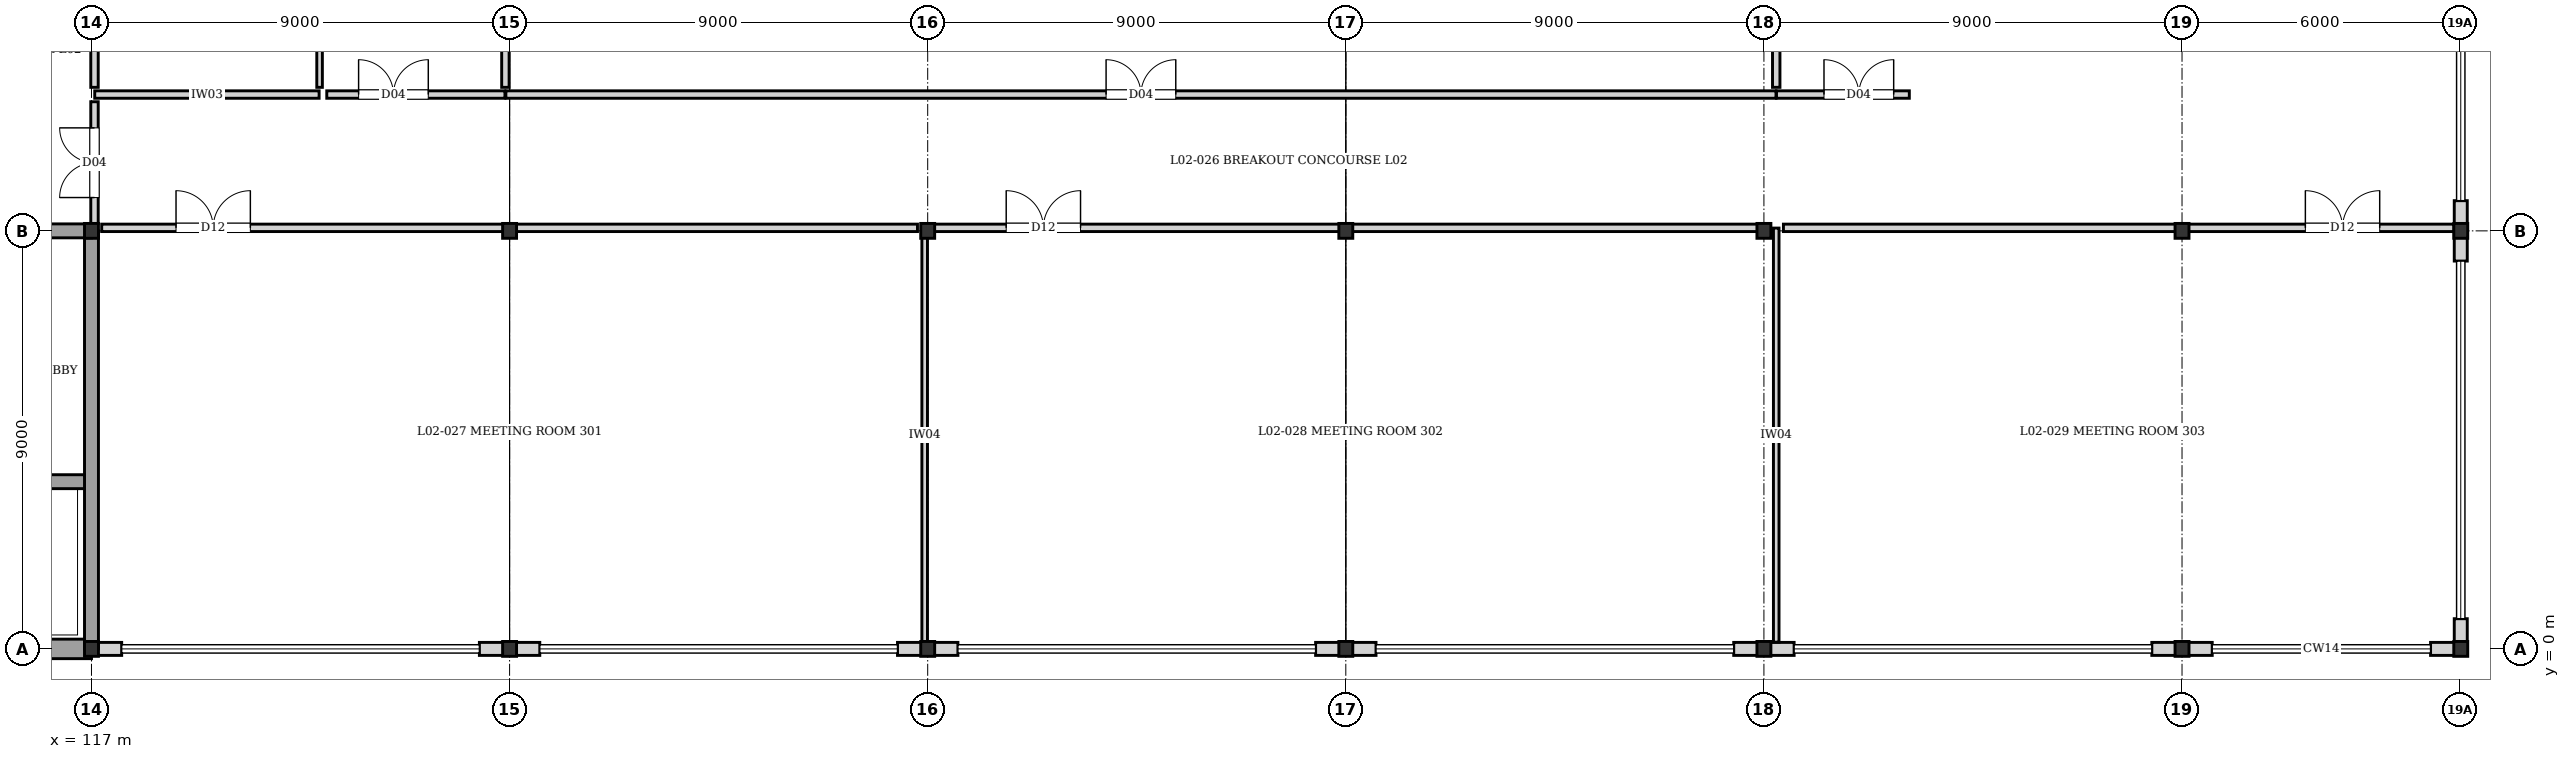
"""IFC4 building model, lengths in metres.
Left out: names, types, materials, properties, quantities, classifications, styles, units other than length and angle.
Written with IfcOpenShell. Run it as: python <this file> out.ifc"""

import sys

from ifc_helpers import new_model, si_unit, direction, frame, frame_2d, origin, origin_2d, place, context, subcontext, project, spatial, rectangle, i_section, extrude, element, fill, save


model = new_model("IFC4")
c1 = context("Model", 3, precision=1e-05, world=origin(), true_north=direction((0.0, 1.0)))
c2 = subcontext(c1, "Body", "Model", "MODEL_VIEW")
j1 = project(units=[si_unit("LENGTHUNIT", "METRE"), si_unit("PLANEANGLEUNIT", "RADIAN")], contexts=[c1])
p1 = place(None, origin())
s1 = spatial("IfcSite", under=j1, at=p1, CompositionType="ELEMENT")
p2 = place(p1, origin())
s2 = spatial("IfcBuilding", under=s1, at=p2, CompositionType="ELEMENT")
p3 = place(p2, frame((0.0, 0.0, 8.16)))
s3 = spatial("IfcBuildingStorey", under=s2, at=p3, CompositionType="ELEMENT", Elevation=8.16)
for number, where, z_axis, x_axis in (
    (1, (117.0, 0.0, 0.0), (0.0, 0.0, 1.0), (1.0, 0.0, 0.0)),
    (2, (117.0, 9.0, 0.0), (0.0, 0.0, 1.0), (1.0, 0.0, 0.0)),
    (3, (126.0, 0.0, 0.0), (0.0, 0.0, 1.0), (1.0, 0.0, 0.0)),
    (4, (126.0, 9.0, 0.0), (0.0, 0.0, 1.0), (1.0, 0.0, 0.0)),
    (5, (135.0, 0.0, 0.0), (0.0, 0.0, 1.0), (1.0, 0.0, 0.0)),
    (6, (135.0, 9.0, 0.0), (0.0, 0.0, 1.0), (1.0, 0.0, 0.0)),
    (7, (144.0, 0.0, 0.0), (0.0, 0.0, 1.0), (1.0, 0.0, 0.0)),
    (8, (144.0, 9.0, 0.0), (0.0, 0.0, 1.0), (1.0, 0.0, 0.0)),
    (9, (153.0, 0.0, 0.0), (0.0, 0.0, 1.0), (1.0, 0.0, 0.0)),
    (10, (153.0, 9.0, 0.0), (0.0, 0.0, 1.0), (1.0, 0.0, 0.0)),
    (11, (162.0, 0.0, 0.0), (0.0, 0.0, 1.0), (1.0, 0.0, 0.0)),
    (12, (162.0, 9.0, 0.0), (0.0, 0.0, 1.0), (1.0, 0.0, 0.0)),
    (13, (168.0, 0.0, 0.0), (0.0, 0.0, 1.0), (1.0, 0.0, 0.0)),
    (14, (168.0, 9.0, 0.0), (0.0, 0.0, 1.0), (1.0, 0.0, 0.0)),
):
    element("IfcColumn", number, at=place(p3, frame(where, z_axis=z_axis, x_axis=x_axis)), inside=s3, PredefinedType="COLUMN", context=c2, shape_type="SweptSolid", body=[
        extrude(i_section(OverallWidth=0.3, OverallDepth=0.32, WebThickness=0.011, FlangeThickness=0.021, at=origin_2d()), origin(), (0.0, 0.0, 1.0), 3.36),
    ])
p4 = place(p3, frame((168.0, 9.65, 0.0), z_axis=(0.0, 0.0, 1.0), x_axis=(0.0, -1.0, 0.0)))
e15 = element("IfcWall", 15, at=p4, inside=s3, PredefinedType="SOLIDWALL", context=c2, shape_type="SweptSolid", body=[
    extrude(rectangle(XDim=0.65, YDim=0.28, at=frame_2d((0.325, 0.0))), origin(), (0.0, 0.0, 1.0), 2.74),
])
p5 = place(p3, frame((168.0, 9.0, 0.0), z_axis=(0.0, 0.0, 1.0), x_axis=(0.0, -1.0, 0.0)))
e16 = element("IfcWall", 16, at=p5, inside=s3, PredefinedType="SOLIDWALL", context=c2, shape_type="SweptSolid", body=[
    extrude(rectangle(XDim=0.65, YDim=0.28, at=frame_2d((0.325, 0.0))), origin(), (0.0, 0.0, 1.0), 2.8),
])
p6 = place(p3, frame((168.0, 0.65, 0.0), z_axis=(0.0, 0.0, 1.0), x_axis=(0.0, -1.0, 0.0)))
e17 = element("IfcWall", 17, at=p6, inside=s3, PredefinedType="SOLIDWALL", context=c2, shape_type="SweptSolid", body=[
    extrude(rectangle(XDim=0.495, YDim=0.28, at=frame_2d((0.248, 0.0))), origin(), (0.0, 0.0, 1.0), 3.11),
])
for number, where, z_axis, x_axis in (
    (18, (168.0, 0.0, 0.0), (0.0, 0.0, 1.0), (-1.0, 0.0, 0.0)),
    (19, (162.65, 0.0, 0.0), (0.0, 0.0, 1.0), (-1.0, 0.0, 0.0)),
):
    element("IfcWall", number, at=place(p3, frame(where, z_axis=z_axis, x_axis=x_axis)), inside=s3, PredefinedType="SOLIDWALL", context=c2, shape_type="SweptSolid", body=[
        extrude(rectangle(XDim=0.65, YDim=0.28, at=frame_2d((0.325, 0.0))), origin(), (0.0, 0.0, 1.0), 2.74),
    ])
for number, where, z_axis, x_axis in (
    (20, (162.0, 0.0, 0.0), (0.0, 0.0, 1.0), (-1.0, 0.0, 0.0)),
    (21, (153.65, 0.0, 0.0), (0.0, 0.0, 1.0), (-1.0, 0.0, 0.0)),
):
    element("IfcWall", number, at=place(p3, frame(where, z_axis=z_axis, x_axis=x_axis)), inside=s3, PredefinedType="SOLIDWALL", context=c2, shape_type="SweptSolid", body=[
        extrude(rectangle(XDim=0.65, YDim=0.28, at=frame_2d((0.325, 0.0))), origin(), (0.0, 0.0, 1.0), 2.8),
    ])
for number, where, z_axis, x_axis in (
    (22, (153.0, 0.0, 0.0), (0.0, 0.0, 1.0), (-1.0, 0.0, 0.0)),
    (23, (144.65, 0.0, 0.0), (0.0, 0.0, 1.0), (-1.0, 0.0, 0.0)),
):
    element("IfcWall", number, at=place(p3, frame(where, z_axis=z_axis, x_axis=x_axis)), inside=s3, PredefinedType="SOLIDWALL", context=c2, shape_type="SweptSolid", body=[
        extrude(rectangle(XDim=0.65, YDim=0.28, at=frame_2d((0.325, 0.0))), origin(), (0.0, 0.0, 1.0), 2.87),
    ])
for number, where, z_axis, x_axis in (
    (24, (144.0, 0.0, 0.0), (0.0, 0.0, 1.0), (-1.0, 0.0, 0.0)),
    (25, (135.65, 0.0, 0.0), (0.0, 0.0, 1.0), (-1.0, 0.0, 0.0)),
):
    element("IfcWall", number, at=place(p3, frame(where, z_axis=z_axis, x_axis=x_axis)), inside=s3, PredefinedType="SOLIDWALL", context=c2, shape_type="SweptSolid", body=[
        extrude(rectangle(XDim=0.65, YDim=0.28, at=frame_2d((0.325, 0.0))), origin(), (0.0, 0.0, 1.0), 2.7),
    ])
for number, where, z_axis, x_axis in (
    (26, (135.0, 0.0, 0.0), (0.0, 0.0, 1.0), (-1.0, 0.0, 0.0)),
    (27, (126.65, 0.0, 0.0), (0.0, 0.0, 1.0), (-1.0, 0.0, 0.0)),
):
    element("IfcWall", number, at=place(p3, frame(where, z_axis=z_axis, x_axis=x_axis)), inside=s3, PredefinedType="SOLIDWALL", context=c2, shape_type="SweptSolid", body=[
        extrude(rectangle(XDim=0.65, YDim=0.28, at=frame_2d((0.325, 0.0))), origin(), (0.0, 0.0, 1.0), 2.74),
    ])
p7 = place(p3, frame((126.0, 0.0, 0.0), z_axis=(0.0, 0.0, 1.0), x_axis=(-1.0, 0.0, 0.0)))
e28 = element("IfcWall", 28, at=p7, inside=s3, PredefinedType="SOLIDWALL", context=c2, shape_type="SweptSolid", body=[
    extrude(rectangle(XDim=0.65, YDim=0.28, at=frame_2d((0.325, 0.0))), origin(), (0.0, 0.0, 1.0), 2.8),
])
p8 = place(p3, frame((117.65, 0.0, 0.0), z_axis=(0.0, 0.0, 1.0), x_axis=(-1.0, 0.0, 0.0)))
e29 = element("IfcWall", 29, at=p8, inside=s3, PredefinedType="SOLIDWALL", context=c2, shape_type="SweptSolid", body=[
    extrude(rectangle(XDim=0.52, YDim=0.28, at=frame_2d((0.26, 0.0))), origin(), (0.0, 0.0, 1.0), 2.8),
])
p9 = place(p3, frame((117.0, 0.0, 0.0), z_axis=(0.0, 0.0, 1.0), x_axis=(-1.0, 0.0, 0.0)))
e30 = element("IfcWall", 30, at=p9, inside=s3, PredefinedType="SOLIDWALL", context=c2, shape_type="SweptSolid", body=[
    extrude(rectangle(XDim=9.0, YDim=0.42, at=frame_2d((4.5, 0.0))), origin(), (0.0, 0.0, 1.0), 3.11),
])
p10 = place(p3, frame((117.0, 0.0, 0.0), z_axis=(0.0, 0.0, 1.0), x_axis=(0.0, 1.0, 0.0)))
e31 = element("IfcWall", 31, at=p10, inside=s3, PredefinedType="SHEAR", context=c2, shape_type="SweptSolid", body=[
    extrude(rectangle(XDim=9.0, YDim=0.3, at=frame_2d((4.5, 0.0))), origin(), (0.0, 0.0, 1.0), 3.11),
])
p11 = place(p3, frame((108.0, 9.0, 0.0), z_axis=(0.0, 0.0, 1.0), x_axis=(1.0, 0.0, 0.0)))
e32 = element("IfcWall", 32, at=p11, inside=s3, PredefinedType="SHEAR", context=c2, shape_type="SweptSolid", body=[
    extrude(rectangle(XDim=9.0, YDim=0.3, at=frame_2d((4.5, 0.0))), origin(), (0.0, 0.0, 1.0), 3.11),
])
p12 = place(p11, frame((6.05, 0.0, 0.0)))
e33 = element("IfcOpeningElement", 33, at=p12, cuts=e32, PredefinedType="OPENING", context=c2, shape_type="SweptSolid", body=[
    extrude(rectangle(XDim=1.4, YDim=2.02, at=frame_2d((0.7, 1.01))), frame((0.0, 0.16, 0.0), z_axis=(0.0, -1.0, 0.0), x_axis=(1.0, 0.0, 0.0)), (0.0, 0.0, 1.0), 0.32),
])
p13 = place(p3, frame((112.65, 3.6, 0.0), z_axis=(0.0, 0.0, 1.0), x_axis=(1.0, 0.0, 0.0)))
e34 = element("IfcWall", 34, at=p13, inside=s3, PredefinedType="SHEAR", context=c2, shape_type="SweptSolid", body=[
    extrude(rectangle(XDim=4.2, YDim=0.3, at=frame_2d((2.1, 0.0))), origin(), (0.0, 0.0, 1.0), 3.11),
])
p14 = place(p13, frame((1.5, 0.0, 0.0)))
e35 = element("IfcOpeningElement", 35, at=p14, cuts=e34, PredefinedType="OPENING", context=c2, shape_type="SweptSolid", body=[
    extrude(rectangle(XDim=1.2, YDim=2.2, at=frame_2d((0.6, 1.1))), frame((0.0, 0.16, 0.0), z_axis=(0.0, -1.0, 0.0), x_axis=(1.0, 0.0, 0.0)), (0.0, 0.0, 1.0), 0.32),
])
p15 = place(p3, frame((117.07, 11.935, 0.0), z_axis=(0.0, 0.0, 1.0), x_axis=(1.0, 0.0, 0.0)))
e36 = element("IfcWall", 36, at=p15, inside=s3, PredefinedType="PARTITIONING", context=c2, shape_type="SweptSolid", body=[
    extrude(rectangle(XDim=4.83, YDim=0.16, at=frame_2d((2.415, 0.0))), origin(), (0.0, 0.0, 1.0), 3.11),
])
p16 = place(p3, frame((134.935, 0.145, 0.0), z_axis=(0.0, 0.0, 1.0), x_axis=(0.0, 1.0, 0.0)))
e37 = element("IfcWall", 37, at=p16, inside=s3, PredefinedType="PARTITIONING", context=c2, shape_type="SweptSolid", body=[
    extrude(rectangle(XDim=8.915, YDim=0.12, at=frame_2d((4.458, 0.0))), origin(), (0.0, 0.0, 1.0), 2.51),
])
p17 = place(p3, frame((153.265, 0.145, 0.0), z_axis=(0.0, 0.0, 1.0), x_axis=(0.0, 1.0, 0.0)))
e38 = element("IfcWall", 38, at=p17, inside=s3, PredefinedType="PARTITIONING", context=c2, shape_type="SweptSolid", body=[
    extrude(rectangle(XDim=8.915, YDim=0.12, at=frame_2d((4.458, 0.0))), origin(), (0.0, 0.0, 1.0), 3.11),
])
p18 = place(p3, frame((121.91, 12.09, 0.0), z_axis=(0.0, 0.0, 1.0), x_axis=(0.0, 1.0, 0.0)))
e39 = element("IfcWall", 39, at=p18, inside=s3, PredefinedType="PARTITIONING", context=c2, shape_type="SweptSolid", body=[
    extrude(rectangle(XDim=5.82, YDim=0.12, at=frame_2d((2.91, 0.0))), origin(), (0.0, 0.0, 1.0), 3.11),
])
p19 = place(p3, frame((117.065, 9.155, 0.0), z_axis=(0.0, 0.0, 1.0), x_axis=(0.0, 1.0, 0.0)))
e40 = element("IfcWall", 40, at=p19, inside=s3, PredefinedType="PARTITIONING", context=c2, shape_type="SweptSolid", body=[
    extrude(rectangle(XDim=2.625, YDim=0.16, at=frame_2d((1.312, 0.0))), origin(), (0.0, 0.0, 1.0), 2.61),
])
p20 = place(p19, frame((0.562, 0.0, 0.0)))
e41 = element("IfcOpeningElement", 41, at=p20, cuts=e40, PredefinedType="OPENING", context=c2, shape_type="SweptSolid", body=[
    extrude(rectangle(XDim=1.5, YDim=2.1, at=frame_2d((0.75, 1.05))), frame((0.0, 0.09, 0.0), z_axis=(0.0, -1.0, 0.0), x_axis=(1.0, 0.0, 0.0)), (0.0, 0.0, 1.0), 0.18),
])
p21 = place(p3, frame((117.065, 12.09, 0.0), z_axis=(0.0, 0.0, 1.0), x_axis=(0.0, 1.0, 0.0)))
e42 = element("IfcWall", 42, at=p21, inside=s3, PredefinedType="PARTITIONING", context=c2, shape_type="SweptSolid", body=[
    extrude(rectangle(XDim=5.82, YDim=0.16, at=frame_2d((2.91, 0.0))), origin(), (0.0, 0.0, 1.0), 2.61),
])
p22 = place(p21, frame((1.712, 0.0, 0.0)))
e43 = element("IfcOpeningElement", 43, at=p22, cuts=e42, PredefinedType="OPENING", context=c2, shape_type="SweptSolid", body=[
    extrude(rectangle(XDim=1.0, YDim=2.1, at=frame_2d((0.5, 1.05))), frame((0.0, 0.09, 0.0), z_axis=(0.0, -1.0, 0.0), x_axis=(1.0, 0.0, 0.0)), (0.0, 0.0, 1.0), 0.18),
])
p23 = place(p3, frame((153.27, 11.935, 0.0), z_axis=(0.0, 0.0, 1.0), x_axis=(1.0, 0.0, 0.0)))
e44 = element("IfcWall", 44, at=p23, inside=s3, PredefinedType="PARTITIONING", context=c2, shape_type="SweptSolid", body=[
    extrude(rectangle(XDim=2.86, YDim=0.16, at=frame_2d((1.43, 0.0))), origin(), (0.0, 0.0, 1.0), 3.11),
])
p24 = place(p23, frame((1.023, 0.0, 0.0)))
e45 = element("IfcOpeningElement", 45, at=p24, cuts=e44, PredefinedType="OPENING", context=c2, shape_type="SweptSolid", body=[
    extrude(rectangle(XDim=1.5, YDim=2.1, at=frame_2d((0.75, 1.05))), frame((0.0, 0.09, 0.0), z_axis=(0.0, -1.0, 0.0), x_axis=(1.0, 0.0, 0.0)), (0.0, 0.0, 1.0), 0.18),
])
p25 = place(p3, frame((117.22, 9.065, 0.0), z_axis=(0.0, 0.0, 1.0), x_axis=(1.0, 0.0, 0.0)))
e46 = element("IfcWall", 46, at=p25, inside=s3, PredefinedType="PARTITIONING", context=c2, shape_type="SweptSolid", body=[
    extrude(rectangle(XDim=8.76, YDim=0.16, at=frame_2d((4.38, 0.0))), origin(), (0.0, 0.0, 1.0), 2.83),
])
p26 = place(p25, frame((1.6, 0.0, 0.0)))
e47 = element("IfcOpeningElement", 47, at=p26, cuts=e46, PredefinedType="OPENING", context=c2, shape_type="SweptSolid", body=[
    extrude(rectangle(XDim=1.6, YDim=2.3, at=frame_2d((0.8, 1.15))), frame((0.0, 0.09, 0.0), z_axis=(0.0, -1.0, 0.0), x_axis=(1.0, 0.0, 0.0)), (0.0, 0.0, 1.0), 0.18),
])
p27 = place(p3, frame((135.09, 9.065, 0.0), z_axis=(0.0, 0.0, 1.0), x_axis=(1.0, 0.0, 0.0)))
e48 = element("IfcWall", 48, at=p27, inside=s3, PredefinedType="PARTITIONING", context=c2, shape_type="SweptSolid", body=[
    extrude(rectangle(XDim=8.89, YDim=0.16, at=frame_2d((4.445, 0.0))), origin(), (0.0, 0.0, 1.0), 2.77),
])
p28 = place(p27, frame((1.6, 0.0, 0.0)))
e49 = element("IfcOpeningElement", 49, at=p28, cuts=e48, PredefinedType="OPENING", context=c2, shape_type="SweptSolid", body=[
    extrude(rectangle(XDim=1.6, YDim=2.3, at=frame_2d((0.8, 1.15))), frame((0.0, 0.09, 0.0), z_axis=(0.0, -1.0, 0.0), x_axis=(1.0, 0.0, 0.0)), (0.0, 0.0, 1.0), 0.18),
])
p29 = place(p3, frame((153.42, 9.065, 0.0), z_axis=(0.0, 0.0, 1.0), x_axis=(1.0, 0.0, 0.0)))
e50 = element("IfcWall", 50, at=p29, inside=s3, PredefinedType="PARTITIONING", context=c2, shape_type="SweptSolid", body=[
    extrude(rectangle(XDim=8.56, YDim=0.16, at=frame_2d((4.28, 0.0))), origin(), (0.0, 0.0, 1.0), 2.66),
])
p30 = place(p3, frame((125.92, 11.935, 0.0), z_axis=(0.0, 0.0, 1.0), x_axis=(1.0, 0.0, 0.0)))
e51 = element("IfcWall", 51, at=p30, inside=s3, PredefinedType="PARTITIONING", context=c2, shape_type="SweptSolid", body=[
    extrude(rectangle(XDim=27.34, YDim=0.16, at=frame_2d((13.67, 0.0))), origin(), (0.0, 0.0, 1.0), 3.11),
])
p31 = place(p30, frame((12.92, 0.0, 0.0)))
e52 = element("IfcOpeningElement", 52, at=p31, cuts=e51, PredefinedType="OPENING", context=c2, shape_type="SweptSolid", body=[
    extrude(rectangle(XDim=1.5, YDim=2.1, at=frame_2d((0.75, 1.05))), frame((0.0, 0.09, 0.0), z_axis=(0.0, -1.0, 0.0), x_axis=(1.0, 0.0, 0.0)), (0.0, 0.0, 1.0), 0.18),
])
p32 = place(p3, frame((122.065, 11.935, 0.0), z_axis=(0.0, 0.0, 1.0), x_axis=(1.0, 0.0, 0.0)))
e53 = element("IfcWall", 53, at=p32, inside=s3, PredefinedType="PARTITIONING", context=c2, shape_type="SweptSolid", body=[
    extrude(rectangle(XDim=3.835, YDim=0.16, at=frame_2d((1.917, 0.0))), origin(), (0.0, 0.0, 1.0), 3.11),
])
p33 = place(p32, frame((0.685, 0.0, 0.0)))
e54 = element("IfcOpeningElement", 54, at=p33, cuts=e53, PredefinedType="OPENING", context=c2, shape_type="SweptSolid", body=[
    extrude(rectangle(XDim=1.5, YDim=2.1, at=frame_2d((0.75, 1.05))), frame((0.0, 0.09, 0.0), z_axis=(0.0, -1.0, 0.0), x_axis=(1.0, 0.0, 0.0)), (0.0, 0.0, 1.0), 0.18),
])
p34 = place(p3, frame((153.265, 12.09, 0.0), z_axis=(0.0, 0.0, 1.0), x_axis=(0.0, 1.0, 0.0)))
e55 = element("IfcWall", 55, at=p34, inside=s3, PredefinedType="PARTITIONING", context=c2, shape_type="SweptSolid", body=[
    extrude(rectangle(XDim=5.765, YDim=0.16, at=frame_2d((2.882, 0.0))), origin(), (0.0, 0.0, 1.0), 3.11),
])
p35 = place(p34, frame((1.441, 0.0, 0.0)))
e56 = element("IfcOpeningElement", 56, at=p35, cuts=e55, PredefinedType="OPENING", context=c2, shape_type="SweptSolid", body=[
    extrude(rectangle(XDim=1.5, YDim=2.1, at=frame_2d((0.75, 1.05))), frame((0.0, 0.09, 0.0), z_axis=(0.0, -1.0, 0.0), x_axis=(1.0, 0.0, 0.0)), (0.0, 0.0, 1.0), 0.18),
])
p36 = place(p3, frame((125.91, 12.09, 0.0), z_axis=(0.0, 0.0, 1.0), x_axis=(0.0, 1.0, 0.0)))
e57 = element("IfcWall", 57, at=p36, inside=s3, PredefinedType="PARTITIONING", context=c2, shape_type="SweptSolid", body=[
    extrude(rectangle(XDim=5.765, YDim=0.16, at=frame_2d((2.882, 0.0))), origin(), (0.0, 0.0, 1.0), 2.51),
])
p37 = place(p36, frame((1.441, 0.0, 0.0)))
e58 = element("IfcOpeningElement", 58, at=p37, cuts=e57, PredefinedType="OPENING", context=c2, shape_type="SweptSolid", body=[
    extrude(rectangle(XDim=1.5, YDim=2.1, at=frame_2d((0.75, 1.05))), frame((0.0, 0.09, 0.0), z_axis=(0.0, -1.0, 0.0), x_axis=(1.0, 0.0, 0.0)), (0.0, 0.0, 1.0), 0.18),
])
p38 = place(p3, frame((125.98, 9.065, 0.0), z_axis=(0.0, 0.0, 1.0), x_axis=(1.0, 0.0, 0.0)))
e59 = element("IfcWall", 59, at=p38, inside=s3, PredefinedType="PARTITIONING", context=c2, shape_type="SweptSolid", body=[
    extrude(rectangle(XDim=8.8, YDim=0.16, at=frame_2d((4.4, 0.0))), origin(), (0.0, 0.0, 1.0), 2.81),
])
p39 = place(p3, frame((143.98, 9.065, 0.0), z_axis=(0.0, 0.0, 1.0), x_axis=(1.0, 0.0, 0.0)))
e60 = element("IfcWall", 60, at=p39, inside=s3, PredefinedType="PARTITIONING", context=c2, shape_type="SweptSolid", body=[
    extrude(rectangle(XDim=9.13, YDim=0.16, at=frame_2d((4.565, 0.0))), origin(), (0.0, 0.0, 1.0), 2.71),
])
p40 = place(p3, frame((161.98, 9.065, 0.0), z_axis=(0.0, 0.0, 1.0), x_axis=(1.0, 0.0, 0.0)))
e61 = element("IfcWall", 61, at=p40, inside=s3, PredefinedType="PARTITIONING", context=c2, shape_type="SweptSolid", body=[
    extrude(rectangle(XDim=5.875, YDim=0.16, at=frame_2d((2.938, 0.0))), origin(), (0.0, 0.0, 1.0), 2.61),
])
p41 = place(p40, frame((2.675, 0.0, 0.0)))
e62 = element("IfcOpeningElement", 62, at=p41, cuts=e61, PredefinedType="OPENING", context=c2, shape_type="SweptSolid", body=[
    extrude(rectangle(XDim=1.6, YDim=2.3, at=frame_2d((0.8, 1.15))), frame((0.0, 0.09, 0.0), z_axis=(0.0, -1.0, 0.0), x_axis=(1.0, 0.0, 0.0)), (0.0, 0.0, 1.0), 0.18),
])
p42 = place(p20, origin())
e63 = element("IfcDoor", 63, at=p42, inside=s3, OperationType="DOUBLE_DOOR_SINGLE_SWING", PredefinedType="DOOR", context=c2, shape_type="SweptSolid", body=[
    extrude(rectangle(XDim=1.5, YDim=2.1, at=frame_2d((0.75, 1.05))), frame((0.0, 0.025, 0.0), z_axis=(0.0, -1.0, 0.0), x_axis=(1.0, 0.0, 0.0)), (0.0, 0.0, 1.0), 0.05),
])
fill(e41, e63)
p43 = place(p24, origin())
e64 = element("IfcDoor", 64, at=p43, inside=s3, OperationType="DOUBLE_DOOR_SINGLE_SWING", PredefinedType="DOOR", context=c2, shape_type="SweptSolid", body=[
    extrude(rectangle(XDim=1.5, YDim=2.1, at=frame_2d((0.75, 1.05))), frame((0.0, 0.025, 0.0), z_axis=(0.0, -1.0, 0.0), x_axis=(1.0, 0.0, 0.0)), (0.0, 0.0, 1.0), 0.05),
])
fill(e45, e64)
p44 = place(p26, origin())
e65 = element("IfcDoor", 65, at=p44, inside=s3, OperationType="DOUBLE_DOOR_SINGLE_SWING", PredefinedType="DOOR", context=c2, shape_type="SweptSolid", body=[
    extrude(rectangle(XDim=1.6, YDim=2.3, at=frame_2d((0.8, 1.15))), frame((0.0, 0.025, 0.0), z_axis=(0.0, -1.0, 0.0), x_axis=(1.0, 0.0, 0.0)), (0.0, 0.0, 1.0), 0.05),
])
fill(e47, e65)
p45 = place(p28, origin())
e66 = element("IfcDoor", 66, at=p45, inside=s3, OperationType="DOUBLE_DOOR_SINGLE_SWING", PredefinedType="DOOR", context=c2, shape_type="SweptSolid", body=[
    extrude(rectangle(XDim=1.6, YDim=2.3, at=frame_2d((0.8, 1.15))), frame((0.0, 0.025, 0.0), z_axis=(0.0, -1.0, 0.0), x_axis=(1.0, 0.0, 0.0)), (0.0, 0.0, 1.0), 0.05),
])
fill(e49, e66)
p46 = place(p41, origin())
e67 = element("IfcDoor", 67, at=p46, inside=s3, OperationType="DOUBLE_DOOR_SINGLE_SWING", PredefinedType="DOOR", context=c2, shape_type="SweptSolid", body=[
    extrude(rectangle(XDim=1.6, YDim=2.3, at=frame_2d((0.8, 1.15))), frame((0.0, 0.025, 0.0), z_axis=(0.0, -1.0, 0.0), x_axis=(1.0, 0.0, 0.0)), (0.0, 0.0, 1.0), 0.05),
])
fill(e62, e67)
p47 = place(p31, origin())
e68 = element("IfcDoor", 68, at=p47, inside=s3, OperationType="DOUBLE_DOOR_SINGLE_SWING", PredefinedType="DOOR", context=c2, shape_type="SweptSolid", body=[
    extrude(rectangle(XDim=1.5, YDim=2.1, at=frame_2d((0.75, 1.05))), frame((0.0, 0.025, 0.0), z_axis=(0.0, -1.0, 0.0), x_axis=(1.0, 0.0, 0.0)), (0.0, 0.0, 1.0), 0.05),
])
fill(e52, e68)
p48 = place(p33, origin())
e69 = element("IfcDoor", 69, at=p48, inside=s3, OperationType="DOUBLE_DOOR_SINGLE_SWING", PredefinedType="DOOR", context=c2, shape_type="SweptSolid", body=[
    extrude(rectangle(XDim=1.5, YDim=2.1, at=frame_2d((0.75, 1.05))), frame((0.0, 0.025, 0.0), z_axis=(0.0, -1.0, 0.0), x_axis=(1.0, 0.0, 0.0)), (0.0, 0.0, 1.0), 0.05),
])
fill(e54, e69)
save(model, sys.argv[1])
